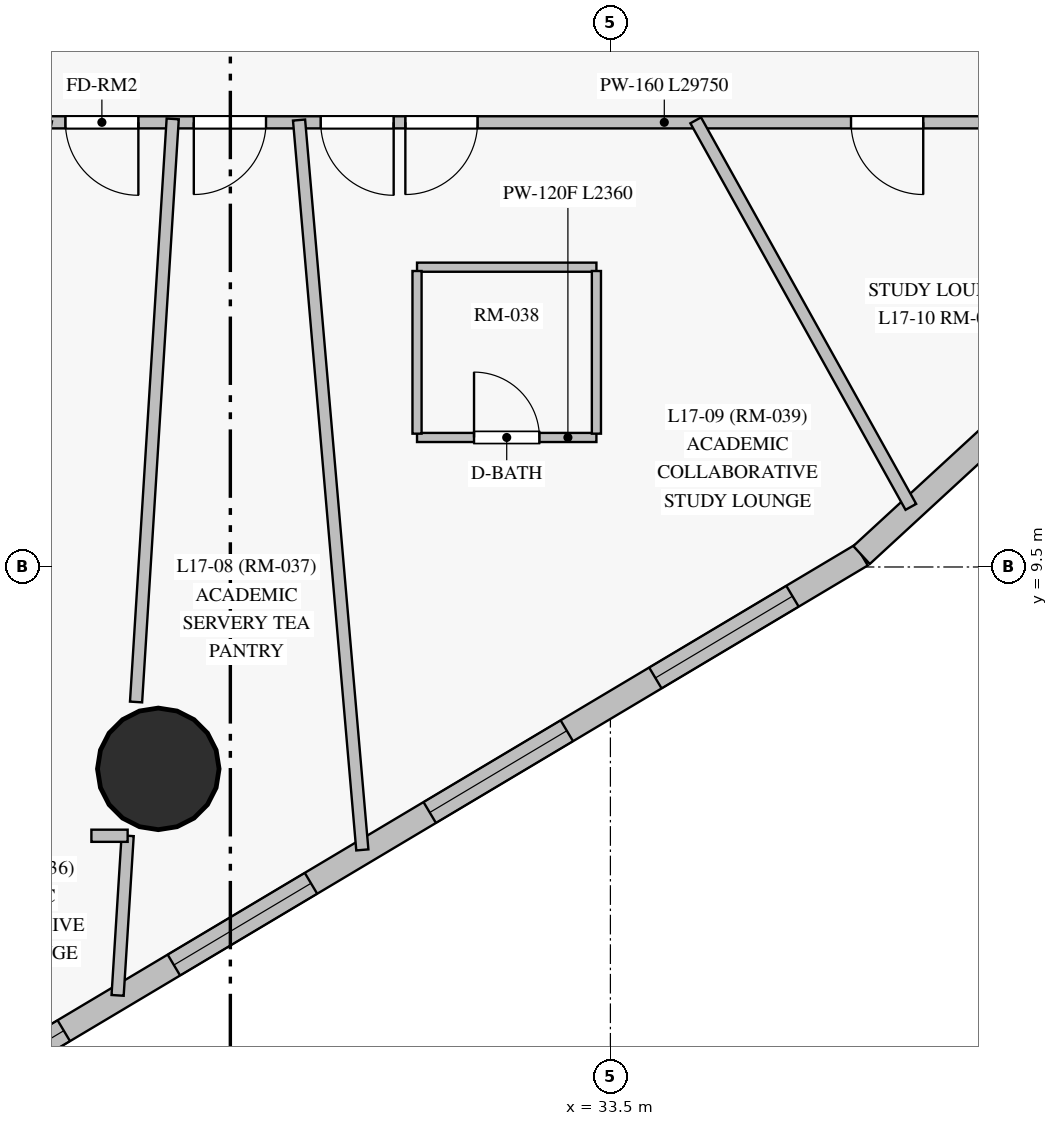
"""IFC4 building model, lengths in metres.
Left out: names, types, materials, properties, quantities, classifications, styles, units other than length and angle.
Written with IfcOpenShell. Run it as: python <this file> out.ifc"""

import sys

from ifc_helpers import new_model, si_unit, direction, frame, frame_2d, origin, origin_with_axes, origin_2d, place, context, subcontext, project, spatial, rectangle, circle, extrude, source, transform, mapped, element, fill, save


model = new_model("IFC4")
c1 = context("Model", 3, precision=1e-05, world=origin(), true_north=direction((0.0, 1.0)))
c2 = subcontext(c1, "Body", "Model", "MODEL_VIEW")
j1 = project(units=[si_unit("LENGTHUNIT", "METRE"), si_unit("PLANEANGLEUNIT", "RADIAN")], contexts=[c1])
p1 = place(None, origin())
s1 = spatial("IfcSite", under=j1, at=p1, CompositionType="ELEMENT")
p2 = place(p1, origin())
s2 = spatial("IfcBuilding", under=s1, at=p2, CompositionType="ELEMENT")
p3 = place(p2, frame((0.0, 0.0, 66.1)))
s3 = spatial("IfcBuildingStorey", under=s2, at=p3, CompositionType="ELEMENT", Elevation=66.1)
m1 = source(origin_with_axes(), c2, "Body", "SweptSolid", [
    extrude(circle(Radius=0.8, at=origin_2d()), origin(), (0.0, 0.0, 1.0), 3.6),
])
p4 = place(p3, frame((27.552, 6.844, 0.0), z_axis=(0.0, 0.0, 1.0), x_axis=(1.0, 0.0, 0.0)))
e1 = element("IfcColumn", 1, at=p4, inside=s3, PredefinedType="COLUMN", context=c2, shape_type="MappedRepresentation", body=[
    mapped(m1, transform((0.0, 0.0, 0.0), scale=1.0)),
])
p5 = place(p3, frame((23.71, 1.85, 0.0), z_axis=(0.0, 0.0, 1.0), x_axis=(0.858916766564, 0.512115209806, 0.0)))
e2 = element("IfcWall", 2, at=p5, inside=s3, PredefinedType="SOLIDWALL", context=c2, shape_type="SweptSolid", body=[
    extrude(rectangle(XDim=15.245, YDim=0.32, at=frame_2d((7.623, 0.0))), origin(), (0.0, 0.0, 1.0), 3.35),
])
p6 = place(p5, frame((0.926, 0.0, 0.85)))
e3 = element("IfcOpeningElement", 3, at=p6, cuts=e2, PredefinedType="OPENING", context=c2, shape_type="SweptSolid", body=[
    extrude(rectangle(XDim=2.1, YDim=1.95, at=frame_2d((1.05, 0.975))), frame((0.0, 0.17, 0.0), z_axis=(0.0, -1.0, 0.0), x_axis=(1.0, 0.0, 0.0)), (0.0, 0.0, 1.0), 0.34),
])
p7 = place(p5, frame((4.712, 0.0, 0.85)))
e4 = element("IfcOpeningElement", 4, at=p7, cuts=e2, PredefinedType="OPENING", context=c2, shape_type="SweptSolid", body=[
    extrude(rectangle(XDim=2.1, YDim=1.95, at=frame_2d((1.05, 0.975))), frame((0.0, 0.17, 0.0), z_axis=(0.0, -1.0, 0.0), x_axis=(1.0, 0.0, 0.0)), (0.0, 0.0, 1.0), 0.34),
])
p8 = place(p5, frame((8.631, 0.0, 0.85)))
e5 = element("IfcOpeningElement", 5, at=p8, cuts=e2, PredefinedType="OPENING", context=c2, shape_type="SweptSolid", body=[
    extrude(rectangle(XDim=2.1, YDim=1.95, at=frame_2d((1.05, 0.975))), frame((0.0, 0.17, 0.0), z_axis=(0.0, -1.0, 0.0), x_axis=(1.0, 0.0, 0.0)), (0.0, 0.0, 1.0), 0.34),
])
p9 = place(p5, frame((12.087, 0.0, 0.85)))
e6 = element("IfcOpeningElement", 6, at=p9, cuts=e2, PredefinedType="OPENING", context=c2, shape_type="SweptSolid", body=[
    extrude(rectangle(XDim=2.1, YDim=1.95, at=frame_2d((1.05, 0.975))), frame((0.0, 0.17, 0.0), z_axis=(0.0, -1.0, 0.0), x_axis=(1.0, 0.0, 0.0)), (0.0, 0.0, 1.0), 0.34),
])
p10 = place(p3, frame((36.804, 9.657, 0.0), z_axis=(0.0, 0.0, 1.0), x_axis=(0.735619702355, 0.677394754562, 0.0)))
e7 = element("IfcWall", 7, at=p10, inside=s3, PredefinedType="SOLIDWALL", context=c2, shape_type="SweptSolid", body=[
    extrude(rectangle(XDim=10.6, YDim=0.32, at=frame_2d((5.3, 0.0))), origin(), (0.0, 0.0, 1.0), 3.35),
])
p11 = place(p10, frame((2.431, 0.0, 0.85)))
e8 = element("IfcOpeningElement", 8, at=p11, cuts=e7, PredefinedType="OPENING", context=c2, shape_type="SweptSolid", body=[
    extrude(rectangle(XDim=2.1, YDim=1.95, at=frame_2d((1.05, 0.975))), frame((0.0, 0.17, 0.0), z_axis=(0.0, -1.0, 0.0), x_axis=(1.0, 0.0, 0.0)), (0.0, 0.0, 1.0), 0.34),
])
p12 = place(p10, frame((6.924, 0.0, 0.85)))
e9 = element("IfcOpeningElement", 9, at=p12, cuts=e7, PredefinedType="OPENING", context=c2, shape_type="SweptSolid", body=[
    extrude(rectangle(XDim=2.1, YDim=1.95, at=frame_2d((1.05, 0.975))), frame((0.0, 0.17, 0.0), z_axis=(0.0, -1.0, 0.0), x_axis=(1.0, 0.0, 0.0)), (0.0, 0.0, 1.0), 0.34),
])
p13 = place(p3, frame((40.25, 15.35, 0.0), z_axis=(0.0, 0.0, 1.0), x_axis=(-1.0, 0.0, 0.0)))
e10 = element("IfcWall", 10, at=p13, inside=s3, PredefinedType="PARTITIONING", context=c2, shape_type="SweptSolid", body=[
    extrude(rectangle(XDim=29.75, YDim=0.16, at=frame_2d((14.875, 0.0))), origin(), (0.0, 0.0, 1.0), 2.7),
])
p14 = place(p13, frame((26.11, 0.0, 0.0)))
e11 = element("IfcOpeningElement", 11, at=p14, cuts=e10, PredefinedType="OPENING", context=c2, shape_type="SweptSolid", body=[
    extrude(rectangle(XDim=0.96, YDim=2.15, at=frame_2d((0.48, 1.075))), frame((0.0, 0.09, 0.0), z_axis=(0.0, -1.0, 0.0), x_axis=(1.0, 0.0, 0.0)), (0.0, 0.0, 1.0), 0.18),
])
p15 = place(p13, frame((21.837, 0.0, 0.0)))
e12 = element("IfcOpeningElement", 12, at=p15, cuts=e10, PredefinedType="OPENING", context=c2, shape_type="SweptSolid", body=[
    extrude(rectangle(XDim=0.95, YDim=2.15, at=frame_2d((0.475, 1.075))), frame((0.0, 0.09, 0.0), z_axis=(0.0, -1.0, 0.0), x_axis=(1.0, 0.0, 0.0)), (0.0, 0.0, 1.0), 0.18),
])
p16 = place(p13, frame((17.716, 0.0, 0.0)))
e13 = element("IfcOpeningElement", 13, at=p16, cuts=e10, PredefinedType="OPENING", context=c2, shape_type="SweptSolid", body=[
    extrude(rectangle(XDim=0.95, YDim=2.15, at=frame_2d((0.475, 1.075))), frame((0.0, 0.09, 0.0), z_axis=(0.0, -1.0, 0.0), x_axis=(1.0, 0.0, 0.0)), (0.0, 0.0, 1.0), 0.18),
])
p17 = place(p13, frame((15.589, 0.0, 0.0)))
e14 = element("IfcOpeningElement", 14, at=p17, cuts=e10, PredefinedType="OPENING", context=c2, shape_type="SweptSolid", body=[
    extrude(rectangle(XDim=0.95, YDim=2.15, at=frame_2d((0.475, 1.075))), frame((0.0, 0.09, 0.0), z_axis=(0.0, -1.0, 0.0), x_axis=(1.0, 0.0, 0.0)), (0.0, 0.0, 1.0), 0.18),
])
p18 = place(p13, frame((12.96, 0.0, 0.0)))
e15 = element("IfcOpeningElement", 15, at=p18, cuts=e10, PredefinedType="OPENING", context=c2, shape_type="SweptSolid", body=[
    extrude(rectangle(XDim=0.96, YDim=2.15, at=frame_2d((0.48, 1.075))), frame((0.0, 0.09, 0.0), z_axis=(0.0, -1.0, 0.0), x_axis=(1.0, 0.0, 0.0)), (0.0, 0.0, 1.0), 0.18),
])
p19 = place(p13, frame((11.281, 0.0, 0.0)))
e16 = element("IfcOpeningElement", 16, at=p19, cuts=e10, PredefinedType="OPENING", context=c2, shape_type="SweptSolid", body=[
    extrude(rectangle(XDim=0.95, YDim=2.15, at=frame_2d((0.475, 1.075))), frame((0.0, 0.09, 0.0), z_axis=(0.0, -1.0, 0.0), x_axis=(1.0, 0.0, 0.0)), (0.0, 0.0, 1.0), 0.18),
])
p20 = place(p13, frame((9.601, 0.0, 0.0)))
e17 = element("IfcOpeningElement", 17, at=p20, cuts=e10, PredefinedType="OPENING", context=c2, shape_type="SweptSolid", body=[
    extrude(rectangle(XDim=0.96, YDim=2.15, at=frame_2d((0.48, 1.075))), frame((0.0, 0.09, 0.0), z_axis=(0.0, -1.0, 0.0), x_axis=(1.0, 0.0, 0.0)), (0.0, 0.0, 1.0), 0.18),
])
p21 = place(p13, frame((8.498, 0.0, 0.0)))
e18 = element("IfcOpeningElement", 18, at=p21, cuts=e10, PredefinedType="OPENING", context=c2, shape_type="SweptSolid", body=[
    extrude(rectangle(XDim=0.95, YDim=2.15, at=frame_2d((0.475, 1.075))), frame((0.0, 0.09, 0.0), z_axis=(0.0, -1.0, 0.0), x_axis=(1.0, 0.0, 0.0)), (0.0, 0.0, 1.0), 0.18),
])
p22 = place(p13, frame((2.634, 0.0, 0.0)))
e19 = element("IfcOpeningElement", 19, at=p22, cuts=e10, PredefinedType="OPENING", context=c2, shape_type="SweptSolid", body=[
    extrude(rectangle(XDim=0.95, YDim=2.15, at=frame_2d((0.475, 1.075))), frame((0.0, 0.09, 0.0), z_axis=(0.0, -1.0, 0.0), x_axis=(1.0, 0.0, 0.0)), (0.0, 0.0, 1.0), 0.18),
])
p23 = place(p3, frame((29.404, 15.38, 0.0), z_axis=(0.0, 0.0, 1.0), x_axis=(0.086405528393, -0.996260048714, 0.0)))
e20 = element("IfcWall", 20, at=p23, inside=s3, PredefinedType="PARTITIONING", context=c2, shape_type="SweptSolid", body=[
    extrude(rectangle(XDim=9.638, YDim=0.16, at=frame_2d((4.819, 0.0))), origin(), (0.0, 0.0, 1.0), 3.35),
])
p24 = place(p3, frame((27.742, 15.395, 0.0), z_axis=(0.0, 0.0, 1.0), x_axis=(-0.062734238662, -0.998030267727, 0.0)))
e21 = element("IfcWall", 21, at=p24, inside=s3, PredefinedType="PARTITIONING", context=c2, shape_type="SweptSolid", body=[
    extrude(rectangle(XDim=7.686, YDim=0.16, at=frame_2d((3.843, 0.0))), origin(), (0.0, 0.0, 1.0), 2.7),
])
p25 = place(p3, frame((34.623, 15.376, 0.0), z_axis=(0.0, 0.0, 1.0), x_axis=(0.486326647137, -0.873777083863, 0.0)))
e22 = element("IfcWall", 22, at=p25, inside=s3, PredefinedType="PARTITIONING", context=c2, shape_type="SweptSolid", body=[
    extrude(rectangle(XDim=5.82, YDim=0.16, at=frame_2d((2.91, 0.0))), origin(), (0.0, 0.0, 1.0), 3.35),
])
p26 = place(p3, frame((30.956, 11.204, 0.0), z_axis=(0.0, 0.0, 1.0), x_axis=(1.0, 0.0, 0.0)))
e23 = element("IfcWall", 23, at=p26, inside=s3, PredefinedType="PARTITIONING", context=c2, shape_type="SweptSolid", body=[
    extrude(rectangle(XDim=2.36, YDim=0.12, at=frame_2d((1.18, 0.0))), origin(), (0.0, 0.0, 1.0), 2.75),
])
p27 = place(p26, frame((0.75, 0.0, 0.0)))
e24 = element("IfcOpeningElement", 24, at=p27, cuts=e23, PredefinedType="OPENING", context=c2, shape_type="SweptSolid", body=[
    extrude(rectangle(XDim=0.86, YDim=2.1, at=frame_2d((0.43, 1.05))), frame((0.0, 0.07, 0.0), z_axis=(0.0, -1.0, 0.0), x_axis=(1.0, 0.0, 0.0)), (0.0, 0.0, 1.0), 0.14),
])
p28 = place(p3, frame((33.316, 13.444, 0.0), z_axis=(0.0, 0.0, 1.0), x_axis=(-1.0, 0.0, 0.0)))
e25 = element("IfcWall", 25, at=p28, inside=s3, PredefinedType="PARTITIONING", context=c2, shape_type="SweptSolid", body=[
    extrude(rectangle(XDim=2.36, YDim=0.12, at=frame_2d((1.18, 0.0))), origin(), (0.0, 0.0, 1.0), 2.75),
])
for number, where, z_axis, x_axis in (
    (26, (33.316, 11.254, 0.0), (0.0, 0.0, 1.0), (0.0, 1.0, 0.0)),
    (27, (30.956, 13.394, 0.0), (0.0, 0.0, 1.0), (0.0, -1.0, 0.0)),
):
    element("IfcWall", number, at=place(p3, frame(where, z_axis=z_axis, x_axis=x_axis)), inside=s3, PredefinedType="PARTITIONING", context=c2, shape_type="SweptSolid", body=[
        extrude(rectangle(XDim=2.14, YDim=0.12, at=frame_2d((1.07, 0.0))), origin(), (0.0, 0.0, 1.0), 3.35),
    ])
p29 = place(p3, frame((27.149, 5.964, 0.0), z_axis=(0.0, 0.0, 1.0), x_axis=(-0.062768334695, -0.998028123932, 0.0)))
e28 = element("IfcWall", 28, at=p29, inside=s3, PredefinedType="PARTITIONING", context=c2, shape_type="SweptSolid", body=[
    extrude(rectangle(XDim=2.104, YDim=0.16, at=frame_2d((1.052, 0.0))), origin(), (0.0, 0.0, 1.0), 3.35),
])
p30 = place(p3, frame((26.672, 5.964, 0.0), z_axis=(0.0, 0.0, 1.0), x_axis=(1.0, 0.0, 0.0)))
e29 = element("IfcWall", 29, at=p30, inside=s3, PredefinedType="PARTITIONING", context=c2, shape_type="SweptSolid", body=[
    extrude(rectangle(XDim=0.477, YDim=0.16, at=frame_2d((0.238, 0.0))), origin(), (0.0, 0.0, 1.0), 3.35),
])
m2 = source(origin_with_axes(), c2, "Body", "SweptSolid", [
    extrude(rectangle(XDim=2.1, YDim=1.95, at=frame_2d((1.05, 0.975))), frame((0.0, 0.03, 0.0), z_axis=(0.0, -1.0, 0.0), x_axis=(1.0, 0.0, 0.0)), (0.0, 0.0, 1.0), 0.06),
])
p31 = place(p6, origin())
e30 = element("IfcWindow", 30, at=p31, inside=s3, PartitioningType="SINGLE_PANEL", PredefinedType="WINDOW", context=c2, shape_type="MappedRepresentation", body=[
    mapped(m2, transform((0.0, 0.0, 0.0), scale=1.0)),
])
fill(e3, e30)
p32 = place(p7, origin())
e31 = element("IfcWindow", 31, at=p32, inside=s3, PartitioningType="SINGLE_PANEL", PredefinedType="WINDOW", context=c2, shape_type="MappedRepresentation", body=[
    mapped(m2, transform((0.0, 0.0, 0.0), scale=1.0)),
])
fill(e4, e31)
p33 = place(p8, origin())
e32 = element("IfcWindow", 32, at=p33, inside=s3, PartitioningType="SINGLE_PANEL", PredefinedType="WINDOW", context=c2, shape_type="MappedRepresentation", body=[
    mapped(m2, transform((0.0, 0.0, 0.0), scale=1.0)),
])
fill(e5, e32)
p34 = place(p9, origin())
e33 = element("IfcWindow", 33, at=p34, inside=s3, PartitioningType="SINGLE_PANEL", PredefinedType="WINDOW", context=c2, shape_type="MappedRepresentation", body=[
    mapped(m2, transform((0.0, 0.0, 0.0), scale=1.0)),
])
fill(e6, e33)
m3 = source(origin_with_axes(), c2, "Body", "SweptSolid", [
    extrude(rectangle(XDim=0.86, YDim=2.1, at=frame_2d((0.43, 1.05))), frame((0.0, 0.025, 0.0), z_axis=(0.0, -1.0, 0.0), x_axis=(1.0, 0.0, 0.0)), (0.0, 0.0, 1.0), 0.05),
])
p35 = place(p27, origin())
e34 = element("IfcDoor", 34, at=p35, inside=s3, OperationType="SINGLE_SWING_LEFT", PredefinedType="DOOR", context=c2, shape_type="MappedRepresentation", body=[
    mapped(m3, transform((0.0, 0.0, 0.0), scale=1.0)),
])
fill(e24, e34)
m4 = source(origin_with_axes(), c2, "Body", "SweptSolid", [
    extrude(rectangle(XDim=0.96, YDim=2.15, at=frame_2d((0.48, 1.075))), frame((0.0, 0.025, 0.0), z_axis=(0.0, -1.0, 0.0), x_axis=(1.0, 0.0, 0.0)), (0.0, 0.0, 1.0), 0.05),
])
p36 = place(p18, origin())
e35 = element("IfcDoor", 35, at=p36, inside=s3, OperationType="SINGLE_SWING_LEFT", PredefinedType="DOOR", context=c2, shape_type="MappedRepresentation", body=[
    mapped(m4, transform((0.0, 0.0, 0.0), scale=1.0)),
])
fill(e15, e35)
m5 = source(origin_with_axes(), c2, "Body", "SweptSolid", [
    extrude(rectangle(XDim=0.95, YDim=2.15, at=frame_2d((0.475, 1.075))), frame((0.0, 0.025, 0.0), z_axis=(0.0, -1.0, 0.0), x_axis=(1.0, 0.0, 0.0)), (0.0, 0.0, 1.0), 0.05),
])
p37 = place(p19, origin())
e36 = element("IfcDoor", 36, at=p37, inside=s3, OperationType="SINGLE_SWING_RIGHT", PredefinedType="DOOR", context=c2, shape_type="MappedRepresentation", body=[
    mapped(m5, transform((0.0, 0.0, 0.0), scale=1.0)),
])
fill(e16, e36)
p38 = place(p20, origin())
e37 = element("IfcDoor", 37, at=p38, inside=s3, OperationType="SINGLE_SWING_LEFT", PredefinedType="DOOR", context=c2, shape_type="MappedRepresentation", body=[
    mapped(m4, transform((0.0, 0.0, 0.0), scale=1.0)),
])
fill(e17, e37)
p39 = place(p21, origin())
e38 = element("IfcDoor", 38, at=p39, inside=s3, OperationType="SINGLE_SWING_RIGHT", PredefinedType="DOOR", context=c2, shape_type="MappedRepresentation", body=[
    mapped(m5, transform((0.0, 0.0, 0.0), scale=1.0)),
])
fill(e18, e38)
p40 = place(p22, origin())
e39 = element("IfcDoor", 39, at=p40, inside=s3, OperationType="SINGLE_SWING_LEFT", PredefinedType="DOOR", context=c2, shape_type="MappedRepresentation", body=[
    mapped(m5, transform((0.0, 0.0, 0.0), scale=1.0)),
])
fill(e19, e39)
save(model, sys.argv[1])
